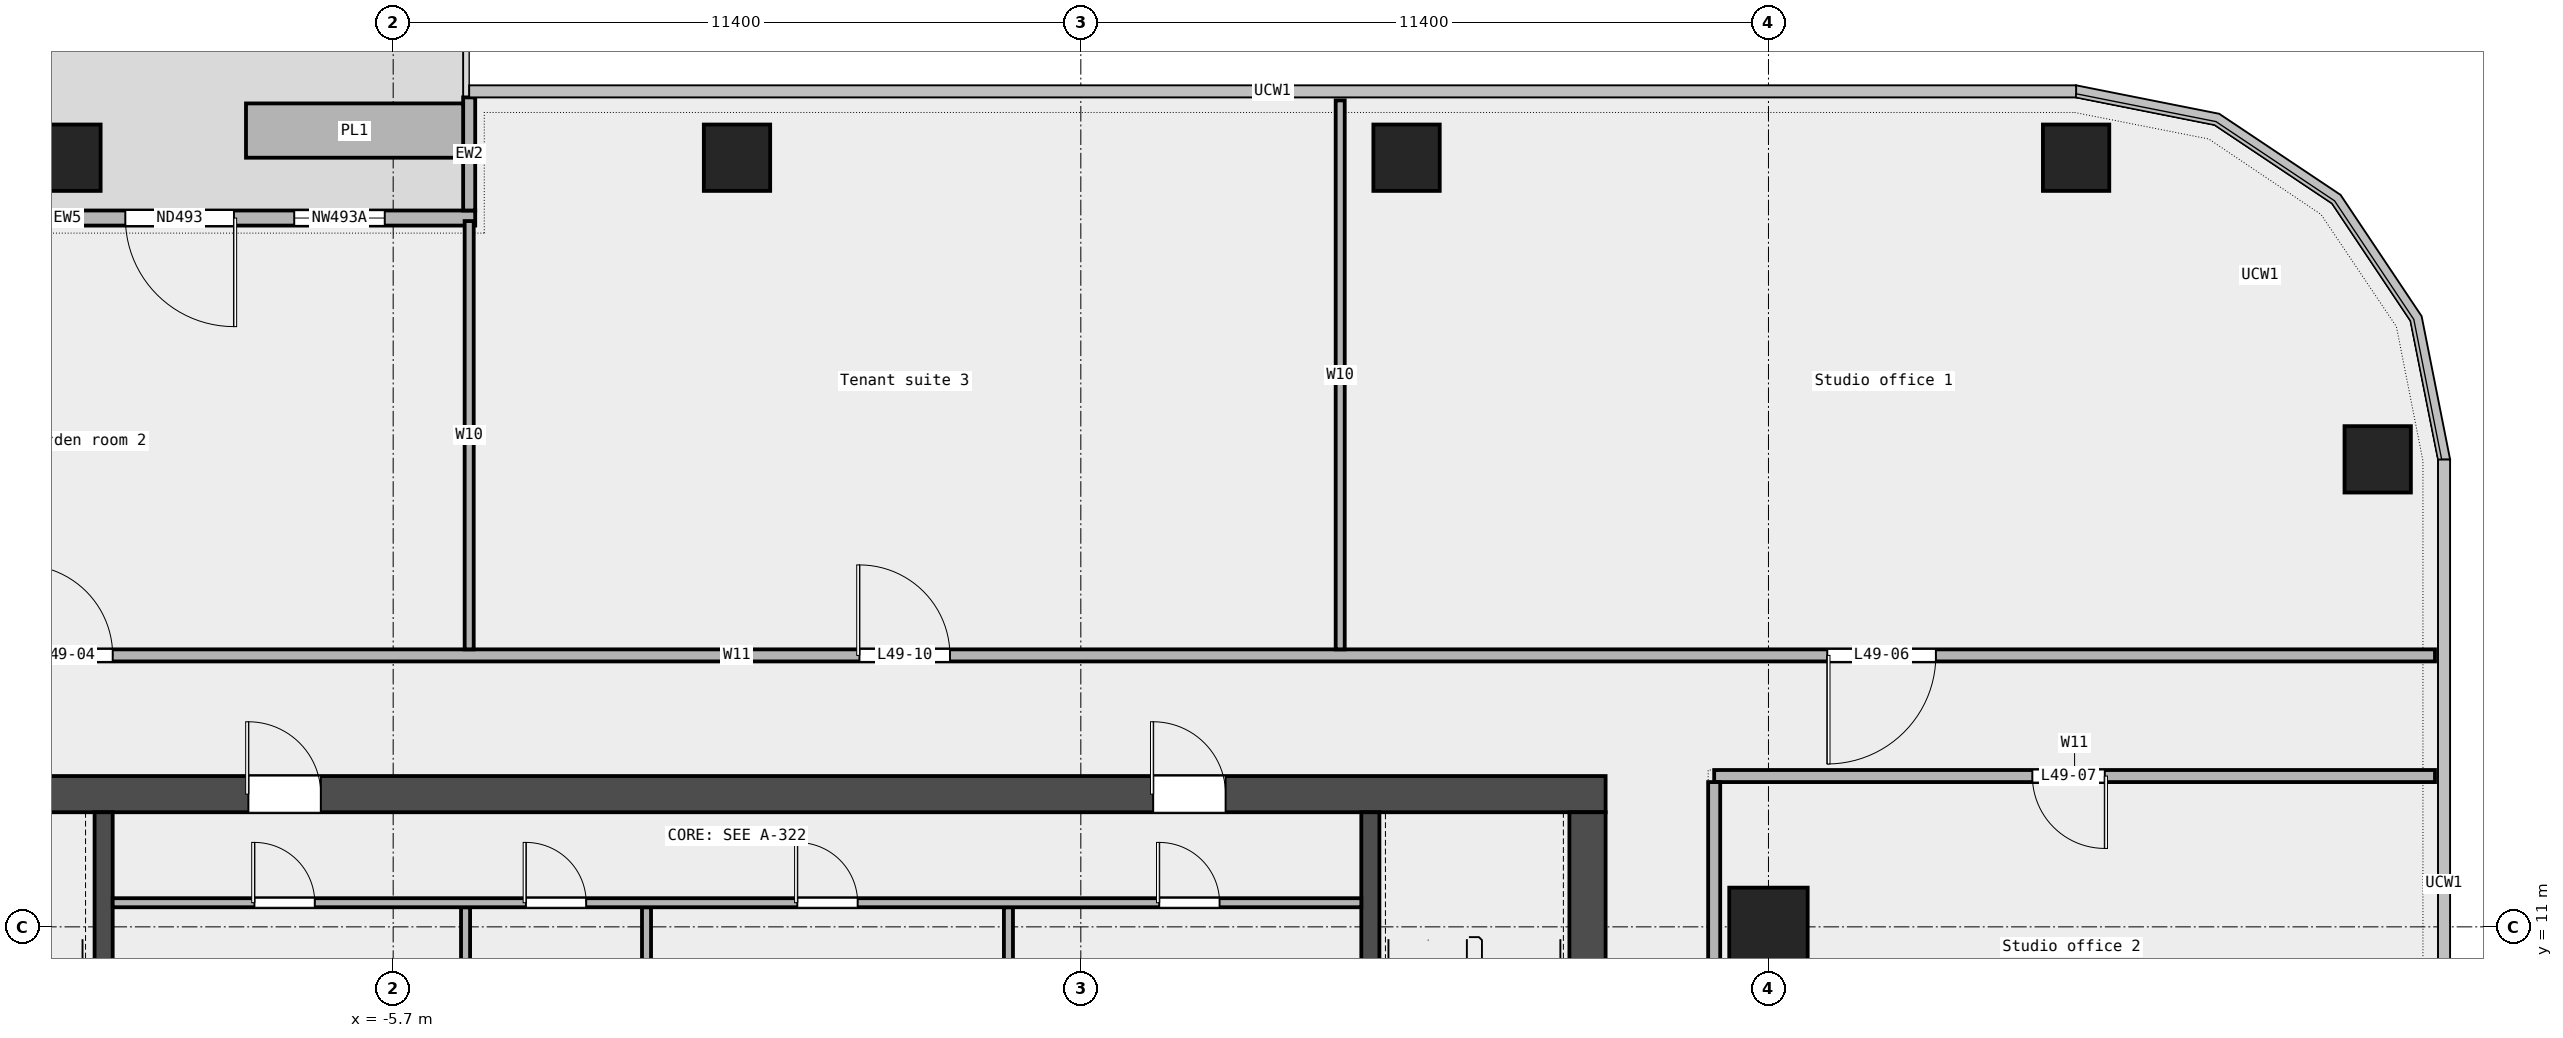
"""IFC4 building model, lengths in metres.
Left out: names, types, materials, properties, quantities, classifications, styles, units other than length and angle.
Written with IfcOpenShell. Run it as: python <this file> out.ifc"""

import sys

from ifc_helpers import new_model, si_unit, direction, frame, frame_2d, origin, origin_2d, place, context, subcontext, project, spatial, rectangle, extrude, element, fill, save


model = new_model("IFC4")
c1 = context("Model", 3, precision=1e-05, world=origin(), true_north=direction((0.0, 1.0)))
c2 = subcontext(c1, "Body", "Model", "MODEL_VIEW")
j1 = project(units=[si_unit("LENGTHUNIT", "METRE"), si_unit("PLANEANGLEUNIT", "RADIAN")], contexts=[c1])
p1 = place(None, origin())
s1 = spatial("IfcSite", under=j1, at=p1, CompositionType="ELEMENT")
p2 = place(p1, origin())
s2 = spatial("IfcBuilding", under=s1, at=p2, CompositionType="ELEMENT")
p3 = place(p2, frame((0.0, 0.0, 231.0)))
s3 = spatial("IfcBuildingStorey", under=s2, at=p3, CompositionType="ELEMENT", Elevation=231.0)
for number, where, z_axis, x_axis in (
    (1, (27.2, 18.75, 0.0), (0.0, 0.0, 1.0), (1.0, 0.0, 0.0)),
    (2, (22.2, 23.75, 0.0), (0.0, 0.0, 1.0), (1.0, 0.0, 0.0)),
    (3, (11.1, 23.75, 0.0), (0.0, 0.0, 1.0), (1.0, 0.0, 0.0)),
    (4, (0.0, 23.75, 0.0), (0.0, 0.0, 1.0), (1.0, 0.0, 0.0)),
    (5, (-11.1, 23.75, 0.0), (0.0, 0.0, 1.0), (1.0, 0.0, 0.0)),
):
    element("IfcColumn", number, at=place(p3, frame(where, z_axis=z_axis, x_axis=x_axis)), inside=s3, PredefinedType="COLUMN", context=c2, shape_type="SweptSolid", body=[
        extrude(rectangle(XDim=1.1, YDim=1.1, at=origin_2d()), origin(), (0.0, 0.0, 1.0), 3.6),
    ])
p4 = place(p3, frame((17.1, 11.0, 0.0), z_axis=(0.0, 0.0, 1.0), x_axis=(1.0, 0.0, 0.0)))
e6 = element("IfcColumn", 6, at=p4, inside=s3, PredefinedType="COLUMN", context=c2, shape_type="SweptSolid", body=[
    extrude(rectangle(XDim=1.3, YDim=1.3, at=origin_2d()), origin(), (0.0, 0.0, 1.0), 3.6),
])
p5 = place(p3, frame((-4.34, 22.75, 0.0), z_axis=(0.0, 0.0, 1.0), x_axis=(-1.0, 0.0, 0.0)))
e7 = element("IfcWall", 7, at=p5, inside=s3, PredefinedType="STANDARD", context=c2, shape_type="SweptSolid", body=[
    extrude(rectangle(XDim=13.52, YDim=0.25, at=frame_2d((6.76, 0.0))), origin(), (0.0, 0.0, 1.0), 3.6),
])
p6 = place(p5, frame((1.5, 0.0, 0.45)))
e8 = element("IfcOpeningElement", 8, at=p6, cuts=e7, PredefinedType="OPENING", context=c2, shape_type="SweptSolid", body=[
    extrude(rectangle(XDim=1.5, YDim=2.4, at=frame_2d((0.75, 1.2))), frame((0.0, 0.137, 0.0), z_axis=(0.0, -1.0, 0.0), x_axis=(1.0, 0.0, 0.0)), (0.0, 0.0, 1.0), 0.274),
])
p7 = place(p5, frame((4.0, 0.0, 0.0)))
e9 = element("IfcOpeningElement", 9, at=p7, cuts=e7, PredefinedType="OPENING", context=c2, shape_type="SweptSolid", body=[
    extrude(rectangle(XDim=1.8, YDim=2.4, at=frame_2d((0.9, 1.2))), frame((0.0, 0.137, 0.0), z_axis=(0.0, -1.0, 0.0), x_axis=(1.0, 0.0, 0.0)), (0.0, 0.0, 1.0), 0.274),
])
p8 = place(p5, frame((10.5, 0.0, 0.45)))
e10 = element("IfcOpeningElement", 10, at=p8, cuts=e7, PredefinedType="OPENING", context=c2, shape_type="SweptSolid", body=[
    extrude(rectangle(XDim=1.5, YDim=2.4, at=frame_2d((0.75, 1.2))), frame((0.0, 0.137, 0.0), z_axis=(0.0, -1.0, 0.0), x_axis=(1.0, 0.0, 0.0)), (0.0, 0.0, 1.0), 0.274),
])
p9 = place(p3, frame((-4.44, 24.75, 0.0), z_axis=(0.0, 0.0, 1.0), x_axis=(0.0, -1.0, 0.0)))
e11 = element("IfcWall", 11, at=p9, inside=s3, PredefinedType="STANDARD", context=c2, shape_type="SweptSolid", body=[
    extrude(rectangle(XDim=1.875, YDim=0.2, at=frame_2d((0.938, 0.0))), origin(), (0.0, 0.0, 1.0), 3.6),
])
p10 = place(p3, frame((-4.54, 24.2, 0.0), z_axis=(0.0, 0.0, 1.0), x_axis=(-1.0, 0.0, 0.0)))
e12 = element("IfcWall", 12, at=p10, inside=s3, PredefinedType="STANDARD", context=c2, shape_type="SweptSolid", body=[
    extrude(rectangle(XDim=3.6, YDim=0.9, at=frame_2d((1.8, 0.0))), origin(), (0.0, 0.0, 1.0), 0.7),
])
p11 = place(p3, frame((16.2, 13.5, 0.0), z_axis=(0.0, 0.0, 1.0), x_axis=(1.0, 0.0, 0.0)))
e13 = element("IfcWall", 13, at=p11, inside=s3, PredefinedType="PARTITIONING", context=c2, shape_type="SweptSolid", body=[
    extrude(rectangle(XDim=11.95, YDim=0.2, at=frame_2d((5.975, 0.0))), origin(), (0.0, 0.0, 1.0), 3.6),
])
p12 = place(p11, frame((5.275, 0.0, 0.0)))
e14 = element("IfcOpeningElement", 14, at=p12, cuts=e13, PredefinedType="OPENING", context=c2, shape_type="SweptSolid", body=[
    extrude(rectangle(XDim=1.2, YDim=2.1, at=frame_2d((0.6, 1.05))), frame((0.0, 0.112, 0.0), z_axis=(0.0, -1.0, 0.0), x_axis=(1.0, 0.0, 0.0)), (0.0, 0.0, 1.0), 0.224),
])
p13 = place(p3, frame((-28.15, 15.5, 0.0), z_axis=(0.0, 0.0, 1.0), x_axis=(1.0, 0.0, 0.0)))
e15 = element("IfcWall", 15, at=p13, inside=s3, PredefinedType="PARTITIONING", context=c2, shape_type="SweptSolid", body=[
    extrude(rectangle(XDim=56.3, YDim=0.2, at=frame_2d((28.15, 0.0))), origin(), (0.0, 0.0, 1.0), 3.6),
])
p14 = place(p13, frame((16.3, 0.0, 0.0)))
e16 = element("IfcOpeningElement", 16, at=p14, cuts=e15, PredefinedType="OPENING", context=c2, shape_type="SweptSolid", body=[
    extrude(rectangle(XDim=1.5, YDim=2.1, at=frame_2d((0.75, 1.05))), frame((0.0, 0.112, 0.0), z_axis=(0.0, -1.0, 0.0), x_axis=(1.0, 0.0, 0.0)), (0.0, 0.0, 1.0), 0.224),
])
p15 = place(p13, frame((46.225, 0.0, 0.0)))
e17 = element("IfcOpeningElement", 17, at=p15, cuts=e15, PredefinedType="OPENING", context=c2, shape_type="SweptSolid", body=[
    extrude(rectangle(XDim=1.8, YDim=2.1, at=frame_2d((0.9, 1.05))), frame((0.0, 0.112, 0.0), z_axis=(0.0, -1.0, 0.0), x_axis=(1.0, 0.0, 0.0)), (0.0, 0.0, 1.0), 0.224),
])
p16 = place(p13, frame((30.18, 0.0, 0.0)))
e18 = element("IfcOpeningElement", 18, at=p16, cuts=e15, PredefinedType="OPENING", context=c2, shape_type="SweptSolid", body=[
    extrude(rectangle(XDim=1.5, YDim=2.1, at=frame_2d((0.75, 1.05))), frame((0.0, 0.112, 0.0), z_axis=(0.0, -1.0, 0.0), x_axis=(1.0, 0.0, 0.0)), (0.0, 0.0, 1.0), 0.224),
])
p17 = place(p13, frame((4.695, 0.0, 0.0)))
e19 = element("IfcOpeningElement", 19, at=p17, cuts=e15, PredefinedType="OPENING", context=c2, shape_type="SweptSolid", body=[
    extrude(rectangle(XDim=1.2, YDim=2.1, at=frame_2d((0.6, 1.05))), frame((0.0, 0.112, 0.0), z_axis=(0.0, -1.0, 0.0), x_axis=(1.0, 0.0, 0.0)), (0.0, 0.0, 1.0), 0.224),
])
p18 = place(p3, frame((-4.44, 15.6, 0.0), z_axis=(0.0, 0.0, 1.0), x_axis=(0.0, 1.0, 0.0)))
e20 = element("IfcWall", 20, at=p18, inside=s3, PredefinedType="PARTITIONING", context=c2, shape_type="SweptSolid", body=[
    extrude(rectangle(XDim=7.1, YDim=0.15, at=frame_2d((3.55, 0.0))), origin(), (0.0, 0.0, 1.0), 3.6),
])
p19 = place(p3, frame((10.0, 15.6, 0.0), z_axis=(0.0, 0.0, 1.0), x_axis=(0.0, 1.0, 0.0)))
e21 = element("IfcWall", 21, at=p19, inside=s3, PredefinedType="PARTITIONING", context=c2, shape_type="SweptSolid", body=[
    extrude(rectangle(XDim=9.1, YDim=0.15, at=frame_2d((4.55, 0.0))), origin(), (0.0, 0.0, 1.0), 3.6),
])
p20 = place(p3, frame((16.2, -7.1, 0.0), z_axis=(0.0, 0.0, 1.0), x_axis=(0.0, 1.0, 0.0)))
e22 = element("IfcWall", 22, at=p20, inside=s3, PredefinedType="PARTITIONING", context=c2, shape_type="SweptSolid", body=[
    extrude(rectangle(XDim=20.5, YDim=0.2, at=frame_2d((10.25, 0.0))), origin(), (0.0, 0.0, 1.0), 3.6),
])
p21 = place(p20, frame((4.845, 0.0, 0.0)))
e23 = element("IfcOpeningElement", 23, at=p21, cuts=e22, PredefinedType="OPENING", context=c2, shape_type="SweptSolid", body=[
    extrude(rectangle(XDim=1.5, YDim=2.1, at=frame_2d((0.75, 1.05))), frame((0.0, 0.112, 0.0), z_axis=(0.0, -1.0, 0.0), x_axis=(1.0, 0.0, 0.0)), (0.0, 0.0, 1.0), 0.224),
])
p22 = place(p20, frame((12.923, 0.0, 0.0)))
e24 = element("IfcOpeningElement", 24, at=p22, cuts=e22, PredefinedType="OPENING", context=c2, shape_type="SweptSolid", body=[
    extrude(rectangle(XDim=0.9, YDim=2.1, at=frame_2d((0.45, 1.05))), frame((0.0, 0.112, 0.0), z_axis=(0.0, -1.0, 0.0), x_axis=(1.0, 0.0, 0.0)), (0.0, 0.0, 1.0), 0.224),
])
p23 = place(p3, frame((-14.4, 13.2, 0.0), z_axis=(0.0, 0.0, 1.0), x_axis=(1.0, 0.0, 0.0)))
e25 = element("IfcWall", 25, at=p23, inside=s3, PredefinedType="SHEAR", context=c2, shape_type="SweptSolid", body=[
    extrude(rectangle(XDim=28.8, YDim=0.6, at=frame_2d((14.4, 0.0))), origin(), (0.0, 0.0, 1.0), 3.7),
])
p24 = place(p23, frame((6.3, 0.0, 0.0)))
e26 = element("IfcOpeningElement", 26, at=p24, cuts=e25, PredefinedType="OPENING", context=c2, shape_type="SweptSolid", body=[
    extrude(rectangle(XDim=1.2, YDim=2.1, at=frame_2d((0.6, 1.05))), frame((0.0, 0.312, 0.0), z_axis=(0.0, -1.0, 0.0), x_axis=(1.0, 0.0, 0.0)), (0.0, 0.0, 1.0), 0.624),
])
p25 = place(p23, frame((21.3, 0.0, 0.0)))
e27 = element("IfcOpeningElement", 27, at=p25, cuts=e25, PredefinedType="OPENING", context=c2, shape_type="SweptSolid", body=[
    extrude(rectangle(XDim=1.2, YDim=2.1, at=frame_2d((0.6, 1.05))), frame((0.0, 0.312, 0.0), z_axis=(0.0, -1.0, 0.0), x_axis=(1.0, 0.0, 0.0)), (0.0, 0.0, 1.0), 0.624),
])
p26 = place(p3, frame((14.1, -6.6, 0.0), z_axis=(0.0, 0.0, 1.0), x_axis=(0.0, 1.0, 0.0)))
e28 = element("IfcWall", 28, at=p26, inside=s3, PredefinedType="SHEAR", context=c2, shape_type="SweptSolid", body=[
    extrude(rectangle(XDim=19.5, YDim=0.6, at=frame_2d((9.75, 0.0))), origin(), (0.0, 0.0, 1.0), 3.7),
])
p27 = place(p26, frame((9.3, 0.0, 0.0)))
e29 = element("IfcOpeningElement", 29, at=p27, cuts=e28, PredefinedType="OPENING", context=c2, shape_type="SweptSolid", body=[
    extrude(rectangle(XDim=1.8, YDim=2.1, at=frame_2d((0.9, 1.05))), frame((0.0, 0.312, 0.0), z_axis=(0.0, -1.0, 0.0), x_axis=(1.0, 0.0, 0.0)), (0.0, 0.0, 1.0), 0.624),
])
for number, where, z_axis, x_axis in (
    (30, (-10.5, 5.25, 0.0), (0.0, 0.0, 1.0), (0.0, 1.0, 0.0)),
    (31, (10.5, 5.25, 0.0), (0.0, 0.0, 1.0), (0.0, 1.0, 0.0)),
):
    element("IfcWall", number, at=place(p3, frame(where, z_axis=z_axis, x_axis=x_axis)), inside=s3, PredefinedType="SHEAR", context=c2, shape_type="SweptSolid", body=[
        extrude(rectangle(XDim=7.65, YDim=0.3, at=frame_2d((3.825, 0.0))), origin(), (0.0, 0.0, 1.0), 3.7),
    ])
for number, where, z_axis, x_axis in (
    (32, (-4.5, 8.55, 0.0), (0.0, 0.0, 1.0), (0.0, 1.0, 0.0)),
    (33, (-1.5, 8.55, 0.0), (0.0, 0.0, 1.0), (0.0, 1.0, 0.0)),
    (34, (4.5, 8.55, 0.0), (0.0, 0.0, 1.0), (0.0, 1.0, 0.0)),
):
    element("IfcWall", number, at=place(p3, frame(where, z_axis=z_axis, x_axis=x_axis)), inside=s3, PredefinedType="PARTITIONING", context=c2, shape_type="SweptSolid", body=[
        extrude(rectangle(XDim=2.775, YDim=0.15, at=frame_2d((1.387, 0.0))), origin(), (0.0, 0.0, 1.0), 3.7),
    ])
p28 = place(p3, frame((-10.35, 11.4, 0.0), z_axis=(0.0, 0.0, 1.0), x_axis=(1.0, 0.0, 0.0)))
e35 = element("IfcWall", 35, at=p28, inside=s3, PredefinedType="PARTITIONING", context=c2, shape_type="SweptSolid", body=[
    extrude(rectangle(XDim=20.7, YDim=0.15, at=frame_2d((10.35, 0.0))), origin(), (0.0, 0.0, 1.0), 3.7),
])
p29 = place(p28, frame((2.35, 0.0, 0.0)))
e36 = element("IfcOpeningElement", 36, at=p29, cuts=e35, PredefinedType="OPENING", context=c2, shape_type="SweptSolid", body=[
    extrude(rectangle(XDim=1.0, YDim=2.1, at=frame_2d((0.5, 1.05))), frame((0.0, 0.087, 0.0), z_axis=(0.0, -1.0, 0.0), x_axis=(1.0, 0.0, 0.0)), (0.0, 0.0, 1.0), 0.174),
])
p30 = place(p28, frame((6.85, 0.0, 0.0)))
e37 = element("IfcOpeningElement", 37, at=p30, cuts=e35, PredefinedType="OPENING", context=c2, shape_type="SweptSolid", body=[
    extrude(rectangle(XDim=1.0, YDim=2.1, at=frame_2d((0.5, 1.05))), frame((0.0, 0.087, 0.0), z_axis=(0.0, -1.0, 0.0), x_axis=(1.0, 0.0, 0.0)), (0.0, 0.0, 1.0), 0.174),
])
p31 = place(p28, frame((11.35, 0.0, 0.0)))
e38 = element("IfcOpeningElement", 38, at=p31, cuts=e35, PredefinedType="OPENING", context=c2, shape_type="SweptSolid", body=[
    extrude(rectangle(XDim=1.0, YDim=2.1, at=frame_2d((0.5, 1.05))), frame((0.0, 0.087, 0.0), z_axis=(0.0, -1.0, 0.0), x_axis=(1.0, 0.0, 0.0)), (0.0, 0.0, 1.0), 0.174),
])
p32 = place(p28, frame((17.35, 0.0, 0.0)))
e39 = element("IfcOpeningElement", 39, at=p32, cuts=e35, PredefinedType="OPENING", context=c2, shape_type="SweptSolid", body=[
    extrude(rectangle(XDim=1.0, YDim=2.1, at=frame_2d((0.5, 1.05))), frame((0.0, 0.087, 0.0), z_axis=(0.0, -1.0, 0.0), x_axis=(1.0, 0.0, 0.0)), (0.0, 0.0, 1.0), 0.174),
])
p33 = place(p6, origin())
e40 = element("IfcWindow", 40, at=p33, inside=s3, PartitioningType="SINGLE_PANEL", PredefinedType="WINDOW", context=c2, shape_type="SweptSolid", body=[
    extrude(rectangle(XDim=1.5, YDim=2.4, at=frame_2d((0.75, 1.2))), frame((0.0, 0.03, 0.0), z_axis=(0.0, -1.0, 0.0), x_axis=(1.0, 0.0, 0.0)), (0.0, 0.0, 1.0), 0.06),
])
fill(e8, e40)
p34 = place(p7, origin())
e41 = element("IfcDoor", 41, at=p34, inside=s3, OperationType="DOUBLE_DOOR_SINGLE_SWING", PredefinedType="DOOR", context=c2, shape_type="SweptSolid", body=[
    extrude(rectangle(XDim=1.8, YDim=2.4, at=frame_2d((0.9, 1.2))), frame((0.0, 0.025, 0.0), z_axis=(0.0, -1.0, 0.0), x_axis=(1.0, 0.0, 0.0)), (0.0, 0.0, 1.0), 0.05),
])
fill(e9, e41)
p35 = place(p14, origin())
e42 = element("IfcDoor", 42, at=p35, inside=s3, OperationType="DOUBLE_DOOR_SINGLE_SWING", PredefinedType="DOOR", context=c2, shape_type="SweptSolid", body=[
    extrude(rectangle(XDim=1.5, YDim=2.1, at=frame_2d((0.75, 1.05))), frame((0.0, 0.025, 0.0), z_axis=(0.0, -1.0, 0.0), x_axis=(1.0, 0.0, 0.0)), (0.0, 0.0, 1.0), 0.05),
])
fill(e16, e42)
p36 = place(p15, origin())
e43 = element("IfcDoor", 43, at=p36, inside=s3, OperationType="DOUBLE_DOOR_SINGLE_SWING", PredefinedType="DOOR", context=c2, shape_type="SweptSolid", body=[
    extrude(rectangle(XDim=1.8, YDim=2.1, at=frame_2d((0.9, 1.05))), frame((0.0, 0.025, 0.0), z_axis=(0.0, -1.0, 0.0), x_axis=(1.0, 0.0, 0.0)), (0.0, 0.0, 1.0), 0.05),
])
fill(e17, e43)
p37 = place(p12, origin())
e44 = element("IfcDoor", 44, at=p37, inside=s3, OperationType="SINGLE_SWING_LEFT", PredefinedType="DOOR", context=c2, shape_type="SweptSolid", body=[
    extrude(rectangle(XDim=1.2, YDim=2.1, at=frame_2d((0.6, 1.05))), frame((0.0, 0.025, 0.0), z_axis=(0.0, -1.0, 0.0), x_axis=(1.0, 0.0, 0.0)), (0.0, 0.0, 1.0), 0.05),
])
fill(e14, e44)
p38 = place(p16, origin())
e45 = element("IfcDoor", 45, at=p38, inside=s3, OperationType="DOUBLE_DOOR_SINGLE_SWING", PredefinedType="DOOR", context=c2, shape_type="SweptSolid", body=[
    extrude(rectangle(XDim=1.5, YDim=2.1, at=frame_2d((0.75, 1.05))), frame((0.0, 0.025, 0.0), z_axis=(0.0, -1.0, 0.0), x_axis=(1.0, 0.0, 0.0)), (0.0, 0.0, 1.0), 0.05),
])
fill(e18, e45)
p39 = place(p29, origin())
e46 = element("IfcDoor", 46, at=p39, inside=s3, OperationType="SINGLE_SWING_LEFT", PredefinedType="DOOR", context=c2, shape_type="SweptSolid", body=[
    extrude(rectangle(XDim=1.0, YDim=2.1, at=frame_2d((0.5, 1.05))), frame((0.0, 0.025, 0.0), z_axis=(0.0, -1.0, 0.0), x_axis=(1.0, 0.0, 0.0)), (0.0, 0.0, 1.0), 0.05),
])
fill(e36, e46)
p40 = place(p30, origin())
e47 = element("IfcDoor", 47, at=p40, inside=s3, OperationType="SINGLE_SWING_LEFT", PredefinedType="DOOR", context=c2, shape_type="SweptSolid", body=[
    extrude(rectangle(XDim=1.0, YDim=2.1, at=frame_2d((0.5, 1.05))), frame((0.0, 0.025, 0.0), z_axis=(0.0, -1.0, 0.0), x_axis=(1.0, 0.0, 0.0)), (0.0, 0.0, 1.0), 0.05),
])
fill(e37, e47)
p41 = place(p31, origin())
e48 = element("IfcDoor", 48, at=p41, inside=s3, OperationType="SINGLE_SWING_LEFT", PredefinedType="DOOR", context=c2, shape_type="SweptSolid", body=[
    extrude(rectangle(XDim=1.0, YDim=2.1, at=frame_2d((0.5, 1.05))), frame((0.0, 0.025, 0.0), z_axis=(0.0, -1.0, 0.0), x_axis=(1.0, 0.0, 0.0)), (0.0, 0.0, 1.0), 0.05),
])
fill(e38, e48)
p42 = place(p32, origin())
e49 = element("IfcDoor", 49, at=p42, inside=s3, OperationType="SINGLE_SWING_LEFT", PredefinedType="DOOR", context=c2, shape_type="SweptSolid", body=[
    extrude(rectangle(XDim=1.0, YDim=2.1, at=frame_2d((0.5, 1.05))), frame((0.0, 0.025, 0.0), z_axis=(0.0, -1.0, 0.0), x_axis=(1.0, 0.0, 0.0)), (0.0, 0.0, 1.0), 0.05),
])
fill(e39, e49)
p43 = place(p24, origin())
e50 = element("IfcDoor", 50, at=p43, inside=s3, OperationType="SINGLE_SWING_LEFT", PredefinedType="DOOR", context=c2, shape_type="SweptSolid", body=[
    extrude(rectangle(XDim=1.2, YDim=2.1, at=frame_2d((0.6, 1.05))), frame((0.0, 0.025, 0.0), z_axis=(0.0, -1.0, 0.0), x_axis=(1.0, 0.0, 0.0)), (0.0, 0.0, 1.0), 0.05),
])
fill(e26, e50)
p44 = place(p25, origin())
e51 = element("IfcDoor", 51, at=p44, inside=s3, OperationType="SINGLE_SWING_RIGHT", PredefinedType="DOOR", context=c2, shape_type="SweptSolid", body=[
    extrude(rectangle(XDim=1.2, YDim=2.1, at=frame_2d((0.6, 1.05))), frame((0.0, 0.025, 0.0), z_axis=(0.0, -1.0, 0.0), x_axis=(1.0, 0.0, 0.0)), (0.0, 0.0, 1.0), 0.05),
])
fill(e27, e51)
save(model, sys.argv[1])
